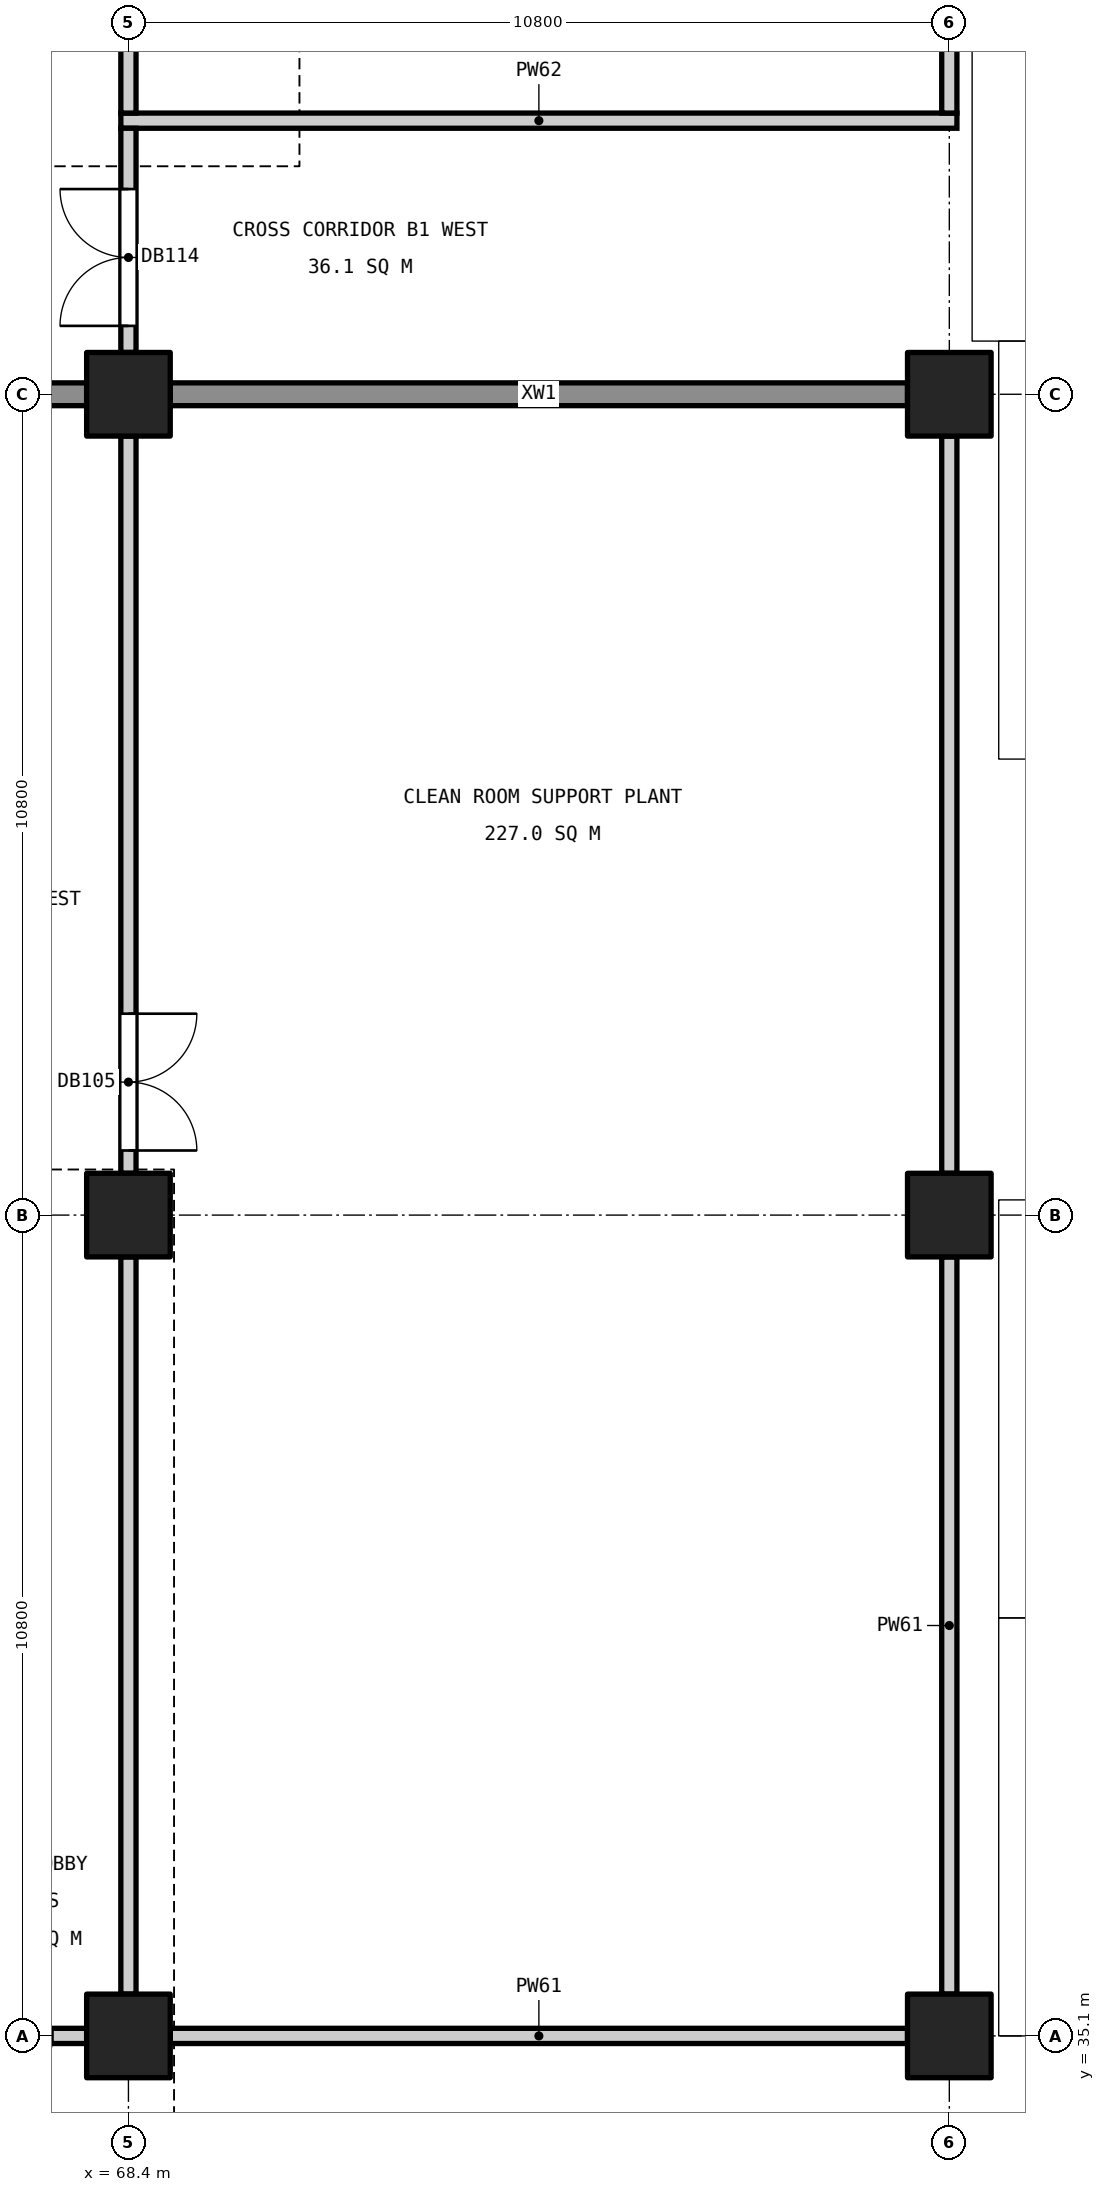
"""IFC4 building model, lengths in metres.
Left out: names, types, materials, properties, quantities, classifications, styles, units other than length and angle.
Written with IfcOpenShell. Run it as: python <this file> out.ifc"""

import sys

from ifc_helpers import new_model, si_unit, direction, frame, frame_2d, origin, origin_2d, place, context, subcontext, project, spatial, rectangle, extrude, element, fill, save


model = new_model("IFC4")
c1 = context("Model", 3, precision=1e-05, world=origin(), true_north=direction((0.0, 1.0)))
c2 = subcontext(c1, "Body", "Model", "MODEL_VIEW")
j1 = project(units=[si_unit("LENGTHUNIT", "METRE"), si_unit("PLANEANGLEUNIT", "RADIAN")], contexts=[c1])
p1 = place(None, origin())
s1 = spatial("IfcSite", under=j1, at=p1, CompositionType="ELEMENT")
p2 = place(p1, origin())
s2 = spatial("IfcBuilding", under=s1, at=p2, CompositionType="ELEMENT")
p3 = place(p2, frame((0.0, 0.0, -4.8)))
s3 = spatial("IfcBuildingStorey", under=s2, at=p3, CompositionType="ELEMENT", Elevation=-4.8)
for number, where, z_axis, x_axis in (
    (1, (68.4, 35.1, 0.0), (0.0, 0.0, 1.0), (1.0, 0.0, 0.0)),
    (2, (68.4, 45.9, 0.0), (0.0, 0.0, 1.0), (1.0, 0.0, 0.0)),
    (3, (68.4, 56.7, 0.0), (0.0, 0.0, 1.0), (1.0, 0.0, 0.0)),
    (4, (79.2, 35.1, 0.0), (0.0, 0.0, 1.0), (1.0, 0.0, 0.0)),
    (5, (79.2, 45.9, 0.0), (0.0, 0.0, 1.0), (1.0, 0.0, 0.0)),
    (6, (79.2, 56.7, 0.0), (0.0, 0.0, 1.0), (1.0, 0.0, 0.0)),
):
    element("IfcColumn", number, at=place(p3, frame(where, z_axis=z_axis, x_axis=x_axis)), inside=s3, PredefinedType="COLUMN", context=c2, shape_type="SweptSolid", body=[
        extrude(rectangle(XDim=1.1, YDim=1.1, at=origin_2d()), origin(), (0.0, 0.0, 1.0), 4.5),
    ])
p4 = place(p3, frame((61.75, 56.7, 0.0), z_axis=(0.0, 0.0, 1.0), x_axis=(1.0, 0.0, 0.0)))
e7 = element("IfcWall", 7, at=p4, inside=s3, PredefinedType="SHEAR", context=c2, shape_type="SweptSolid", body=[
    extrude(rectangle(XDim=6.1, YDim=0.3, at=frame_2d((3.05, 0.0))), origin(), (0.0, 0.0, 1.0), 4.5),
])
p5 = place(p4, frame((2.15, 0.0, 0.0)))
e8 = element("IfcOpeningElement", 8, at=p5, cuts=e7, PredefinedType="OPENING", context=c2, shape_type="SweptSolid", body=[
    extrude(rectangle(XDim=1.8, YDim=2.1, at=frame_2d((0.9, 1.05))), frame((0.0, 0.16, 0.0), z_axis=(0.0, -1.0, 0.0), x_axis=(1.0, 0.0, 0.0)), (0.0, 0.0, 1.0), 0.32),
])
p6 = place(p3, frame((68.95, 56.7, 0.0), z_axis=(0.0, 0.0, 1.0), x_axis=(1.0, 0.0, 0.0)))
e9 = element("IfcWall", 9, at=p6, inside=s3, PredefinedType="SHEAR", context=c2, shape_type="SweptSolid", body=[
    extrude(rectangle(XDim=9.7, YDim=0.3, at=frame_2d((4.85, 0.0))), origin(), (0.0, 0.0, 1.0), 4.5),
])
p7 = place(p3, frame((65.95, 35.1, 0.0), z_axis=(0.0, 0.0, 1.0), x_axis=(1.0, 0.0, 0.0)))
e10 = element("IfcWall", 10, at=p7, inside=s3, PredefinedType="PARTITIONING", context=c2, shape_type="SweptSolid", body=[
    extrude(rectangle(XDim=1.9, YDim=0.2, at=frame_2d((0.95, 0.0))), origin(), (0.0, 0.0, 1.0), 3.7),
])
p8 = place(p7, frame((0.45, 0.0, 0.0)))
e11 = element("IfcOpeningElement", 11, at=p8, cuts=e10, PredefinedType="OPENING", context=c2, shape_type="SweptSolid", body=[
    extrude(rectangle(XDim=1.0, YDim=2.1, at=frame_2d((0.5, 1.05))), frame((0.0, 0.11, 0.0), z_axis=(0.0, -1.0, 0.0), x_axis=(1.0, 0.0, 0.0)), (0.0, 0.0, 1.0), 0.22),
])
p9 = place(p3, frame((68.95, 35.1, 0.0), z_axis=(0.0, 0.0, 1.0), x_axis=(1.0, 0.0, 0.0)))
e12 = element("IfcWall", 12, at=p9, inside=s3, PredefinedType="PARTITIONING", context=c2, shape_type="SweptSolid", body=[
    extrude(rectangle(XDim=9.7, YDim=0.2, at=frame_2d((4.85, 0.0))), origin(), (0.0, 0.0, 1.0), 3.7),
])
p10 = place(p3, frame((68.3, 60.3, 0.0), z_axis=(0.0, 0.0, 1.0), x_axis=(1.0, 0.0, 0.0)))
e13 = element("IfcWall", 13, at=p10, inside=s3, PredefinedType="PARTITIONING", context=c2, shape_type="SweptSolid", body=[
    extrude(rectangle(XDim=11.0, YDim=0.2, at=frame_2d((5.5, 0.0))), origin(), (0.0, 0.0, 1.0), 3.7),
])
p11 = place(p3, frame((68.4, 35.65, 0.0), z_axis=(0.0, 0.0, 1.0), x_axis=(0.0, 1.0, 0.0)))
e14 = element("IfcWall", 14, at=p11, inside=s3, PredefinedType="PARTITIONING", context=c2, shape_type="SweptSolid", body=[
    extrude(rectangle(XDim=9.7, YDim=0.2, at=frame_2d((4.85, 0.0))), origin(), (0.0, 0.0, 1.0), 3.4),
])
p12 = place(p3, frame((68.4, 46.45, 0.0), z_axis=(0.0, 0.0, 1.0), x_axis=(0.0, 1.0, 0.0)))
e15 = element("IfcWall", 15, at=p12, inside=s3, PredefinedType="PARTITIONING", context=c2, shape_type="SweptSolid", body=[
    extrude(rectangle(XDim=9.7, YDim=0.2, at=frame_2d((4.85, 0.0))), origin(), (0.0, 0.0, 1.0), 3.4),
])
p13 = place(p12, frame((0.3, 0.0, 0.0)))
e16 = element("IfcOpeningElement", 16, at=p13, cuts=e15, PredefinedType="OPENING", context=c2, shape_type="SweptSolid", body=[
    extrude(rectangle(XDim=1.8, YDim=2.1, at=frame_2d((0.9, 1.05))), frame((0.0, 0.11, 0.0), z_axis=(0.0, -1.0, 0.0), x_axis=(1.0, 0.0, 0.0)), (0.0, 0.0, 1.0), 0.22),
])
p14 = place(p3, frame((68.4, 57.25, 0.0), z_axis=(0.0, 0.0, 1.0), x_axis=(0.0, 1.0, 0.0)))
e17 = element("IfcWall", 17, at=p14, inside=s3, PredefinedType="PARTITIONING", context=c2, shape_type="SweptSolid", body=[
    extrude(rectangle(XDim=2.95, YDim=0.2, at=frame_2d((1.475, 0.0))), origin(), (0.0, 0.0, 1.0), 3.4),
])
p15 = place(p14, frame((0.35, 0.0, 0.0)))
e18 = element("IfcOpeningElement", 18, at=p15, cuts=e17, PredefinedType="OPENING", context=c2, shape_type="SweptSolid", body=[
    extrude(rectangle(XDim=1.8, YDim=2.1, at=frame_2d((0.9, 1.05))), frame((0.0, 0.11, 0.0), z_axis=(0.0, -1.0, 0.0), x_axis=(1.0, 0.0, 0.0)), (0.0, 0.0, 1.0), 0.22),
])
p16 = place(p3, frame((68.4, 60.4, 0.0), z_axis=(0.0, 0.0, 1.0), x_axis=(0.0, 1.0, 0.0)))
e19 = element("IfcWall", 19, at=p16, inside=s3, PredefinedType="PARTITIONING", context=c2, shape_type="SweptSolid", body=[
    extrude(rectangle(XDim=6.55, YDim=0.2, at=frame_2d((3.275, 0.0))), origin(), (0.0, 0.0, 1.0), 3.4),
])
p17 = place(p3, frame((79.2, 35.65, 0.0), z_axis=(0.0, 0.0, 1.0), x_axis=(0.0, 1.0, 0.0)))
e20 = element("IfcWall", 20, at=p17, inside=s3, PredefinedType="PARTITIONING", context=c2, shape_type="SweptSolid", body=[
    extrude(rectangle(XDim=9.7, YDim=0.2, at=frame_2d((4.85, 0.0))), origin(), (0.0, 0.0, 1.0), 3.4),
])
p18 = place(p3, frame((79.2, 46.45, 0.0), z_axis=(0.0, 0.0, 1.0), x_axis=(0.0, 1.0, 0.0)))
e21 = element("IfcWall", 21, at=p18, inside=s3, PredefinedType="PARTITIONING", context=c2, shape_type="SweptSolid", body=[
    extrude(rectangle(XDim=9.7, YDim=0.2, at=frame_2d((4.85, 0.0))), origin(), (0.0, 0.0, 1.0), 3.4),
])
p19 = place(p3, frame((79.2, 60.4, 0.0), z_axis=(0.0, 0.0, 1.0), x_axis=(0.0, 1.0, 0.0)))
e22 = element("IfcWall", 22, at=p19, inside=s3, PredefinedType="PARTITIONING", context=c2, shape_type="SweptSolid", body=[
    extrude(rectangle(XDim=6.55, YDim=0.2, at=frame_2d((3.275, 0.0))), origin(), (0.0, 0.0, 1.0), 3.4),
])
p20 = place(p13, frame((1.8, 0.0, 0.0), z_axis=(0.0, 0.0, 1.0), x_axis=(-1.0, 0.0, 0.0)))
e23 = element("IfcDoor", 23, at=p20, inside=s3, OperationType="DOUBLE_DOOR_SINGLE_SWING", PredefinedType="DOOR", context=c2, shape_type="SweptSolid", body=[
    extrude(rectangle(XDim=1.8, YDim=2.1, at=frame_2d((0.9, 1.05))), frame((0.0, 0.025, 0.0), z_axis=(0.0, -1.0, 0.0), x_axis=(1.0, 0.0, 0.0)), (0.0, 0.0, 1.0), 0.05),
])
fill(e16, e23)
p21 = place(p15, origin())
e24 = element("IfcDoor", 24, at=p21, inside=s3, OperationType="DOUBLE_DOOR_SINGLE_SWING", PredefinedType="DOOR", context=c2, shape_type="SweptSolid", body=[
    extrude(rectangle(XDim=1.8, YDim=2.1, at=frame_2d((0.9, 1.05))), frame((0.0, 0.025, 0.0), z_axis=(0.0, -1.0, 0.0), x_axis=(1.0, 0.0, 0.0)), (0.0, 0.0, 1.0), 0.05),
])
fill(e18, e24)
save(model, sys.argv[1])
